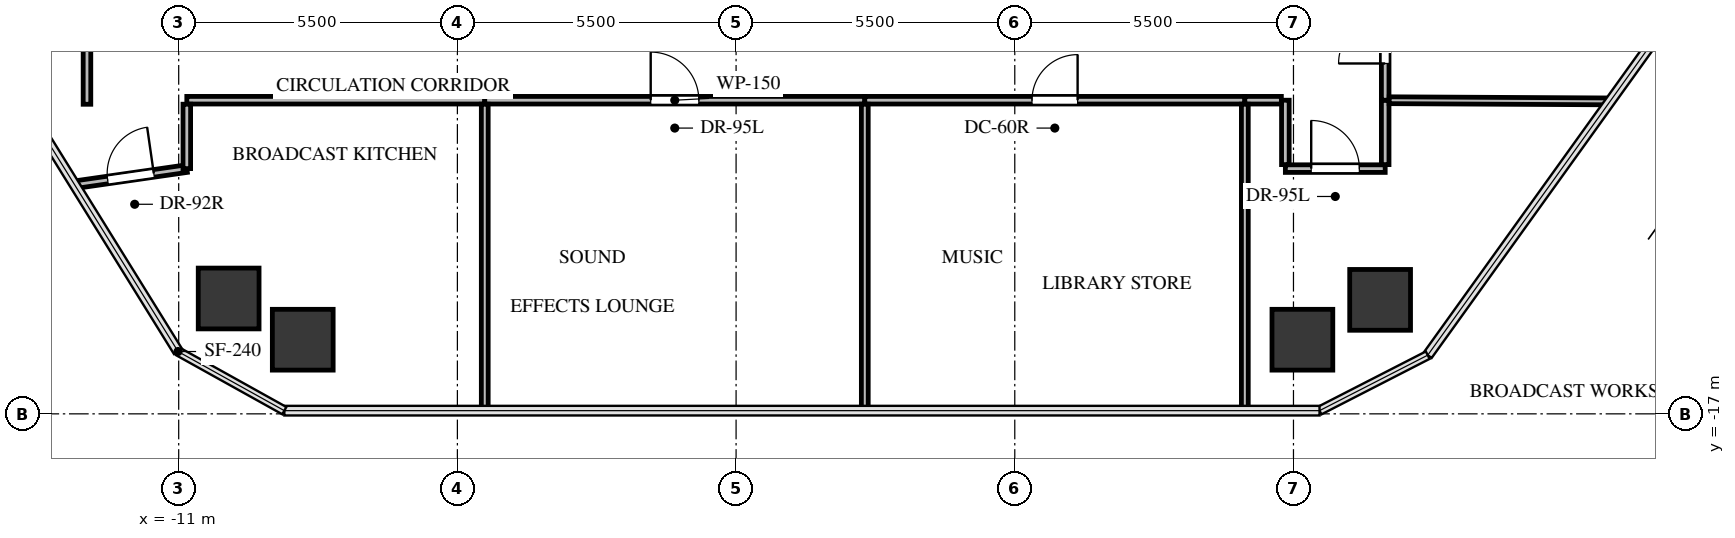
"""IFC4 building model, lengths in metres.
Left out: names, types, materials, properties, quantities, classifications, styles, units other than length and angle.
Written with IfcOpenShell. Run it as: python <this file> out.ifc"""

import sys

from ifc_helpers import new_model, si_unit, direction, frame, frame_2d, origin, origin_2d, place, context, subcontext, project, spatial, rectangle, extrude, source, transform, mapped, element, fill, save


model = new_model("IFC4")
c1 = context("Model", 3, precision=1e-05, world=origin(), true_north=direction((0.0, 1.0)))
c2 = subcontext(c1, "Body", "Model", "MODEL_VIEW")
j1 = project(units=[si_unit("LENGTHUNIT", "METRE"), si_unit("PLANEANGLEUNIT", "RADIAN")], contexts=[c1])
p1 = place(None, origin())
s1 = spatial("IfcSite", under=j1, at=p1, CompositionType="ELEMENT")
p2 = place(p1, origin())
s2 = spatial("IfcBuilding", under=s1, at=p2, CompositionType="ELEMENT")
p3 = place(p2, frame((0.0, 0.0, 123.9)))
s3 = spatial("IfcBuildingStorey", under=s2, at=p3, CompositionType="ELEMENT", Elevation=123.9)
m1 = source(origin(), c2, "Body", "SweptSolid", [
    extrude(rectangle(XDim=1.2, YDim=1.2, at=origin_2d()), origin(), (0.0, 0.0, 1.0), 3.3),
])
for number, where, z_axis, x_axis in (
    (1, (-10.014, -14.723, -0.24), (0.0, 0.0, 1.0), (1.0, 0.0, 0.0)),
    (2, (12.71, -14.75, -0.24), (0.0, 0.0, 1.0), (1.0, 0.0, 0.0)),
    (3, (11.176, -15.537, -0.24), (0.0, 0.0, 1.0), (1.0, 0.0, 0.0)),
    (4, (-8.552, -15.537, -0.24), (0.0, 0.0, 1.0), (1.0, 0.0, 0.0)),
):
    element("IfcColumn", number, at=place(p3, frame(where, z_axis=z_axis, x_axis=x_axis)), inside=s3, PredefinedType="COLUMN", context=c2, shape_type="MappedRepresentation", body=[
        mapped(m1, transform((0.0, 0.0, 0.0), x_axis=(1.0, 0.0, 0.0), y_axis=(0.0, 1.0, 0.0), z_axis=(0.0, 0.0, 1.0), scale=1.0)),
    ])
p4 = place(p3, frame((-10.84, -10.81, 0.0), z_axis=(0.0, 0.0, 1.0), x_axis=(1.0, 0.0, 0.0)))
e5 = element("IfcWall", 5, at=p4, inside=s3, PredefinedType="PARTITIONING", context=c2, shape_type="SweptSolid", body=[
    extrude(rectangle(XDim=5.88, YDim=0.15, at=frame_2d((2.94, 0.0))), origin(), (0.0, 0.0, 1.0), 2.212),
])
p5 = place(p3, frame((-13.054, -12.479, 0.0), z_axis=(0.0, 0.0, 1.0), x_axis=(0.989787303338, 0.142552075227, 0.0)))
e6 = element("IfcWall", 6, at=p5, inside=s3, PredefinedType="PARTITIONING", context=c2, shape_type="SweptSolid", body=[
    extrude(rectangle(XDim=2.237, YDim=0.15, at=frame_2d((1.118, 0.0))), origin(), (0.0, 0.0, 1.0), 2.38),
])
p6 = place(p5, frame((0.658, 0.0, 0.0)))
e7 = element("IfcOpeningElement", 7, at=p6, cuts=e6, PredefinedType="OPENING", context=c2, shape_type="SweptSolid", body=[
    extrude(rectangle(XDim=0.92, YDim=2.1, at=frame_2d((0.46, 1.05))), frame((0.0, 0.085, 0.0), z_axis=(0.0, -1.0, 0.0), x_axis=(1.0, 0.0, 0.0)), (0.0, 0.0, 1.0), 0.17),
])
p7 = place(p3, frame((-10.84, -12.16, 0.0), z_axis=(0.0, 0.0, 1.0), x_axis=(0.0, 1.0, 0.0)))
e8 = element("IfcWall", 8, at=p7, inside=s3, PredefinedType="PARTITIONING", context=c2, shape_type="SweptSolid", body=[
    extrude(rectangle(XDim=1.271, YDim=0.15, at=frame_2d((0.635, 0.0))), origin(), (0.0, 0.0, 1.0), 3.045),
])
p8 = place(p3, frame((-4.96, -10.81, 0.0), z_axis=(0.0, 0.0, 1.0), x_axis=(1.0, 0.0, 0.0)))
e9 = element("IfcWall", 9, at=p8, inside=s3, PredefinedType="PARTITIONING", context=c2, shape_type="SweptSolid", body=[
    extrude(rectangle(XDim=7.5, YDim=0.15, at=frame_2d((3.75, 0.0))), origin(), (0.0, 0.0, 1.0), 2.212),
])
p9 = place(p8, frame((3.275, 0.0, 0.0)))
e10 = element("IfcOpeningElement", 10, at=p9, cuts=e9, PredefinedType="OPENING", context=c2, shape_type="SweptSolid", body=[
    extrude(rectangle(XDim=0.95, YDim=2.1, at=frame_2d((0.475, 1.05))), frame((0.0, 0.085, 0.0), z_axis=(0.0, -1.0, 0.0), x_axis=(1.0, 0.0, 0.0)), (0.0, 0.0, 1.0), 0.17),
])
p10 = place(p3, frame((2.54, -10.81, 0.0), z_axis=(0.0, 0.0, 1.0), x_axis=(1.0, 0.0, 0.0)))
e11 = element("IfcWall", 11, at=p10, inside=s3, PredefinedType="PARTITIONING", context=c2, shape_type="SweptSolid", body=[
    extrude(rectangle(XDim=7.5, YDim=0.15, at=frame_2d((3.75, 0.0))), origin(), (0.0, 0.0, 1.0), 2.212),
])
p11 = place(p10, frame((3.3, 0.0, 0.0)))
e12 = element("IfcOpeningElement", 12, at=p11, cuts=e11, PredefinedType="OPENING", context=c2, shape_type="SweptSolid", body=[
    extrude(rectangle(XDim=0.9, YDim=2.05, at=frame_2d((0.45, 1.025))), frame((0.0, 0.085, 0.0), z_axis=(0.0, -1.0, 0.0), x_axis=(1.0, 0.0, 0.0)), (0.0, 0.0, 1.0), 0.17),
])
p12 = place(p3, frame((10.84, -12.16, 0.0), z_axis=(0.0, 0.0, 1.0), x_axis=(1.0, 0.0, 0.0)))
e13 = element("IfcWall", 13, at=p12, inside=s3, PredefinedType="PARTITIONING", context=c2, shape_type="SweptSolid", body=[
    extrude(rectangle(XDim=1.97, YDim=0.15, at=frame_2d((0.985, 0.0))), origin(), (0.0, 0.0, 1.0), 3.045),
])
p13 = place(p12, frame((0.51, 0.0, 0.0)))
e14 = element("IfcOpeningElement", 14, at=p13, cuts=e13, PredefinedType="OPENING", context=c2, shape_type="SweptSolid", body=[
    extrude(rectangle(XDim=0.95, YDim=2.1, at=frame_2d((0.475, 1.05))), frame((0.0, 0.085, 0.0), z_axis=(0.0, -1.0, 0.0), x_axis=(1.0, 0.0, 0.0)), (0.0, 0.0, 1.0), 0.17),
])
for number, where, z_axis, x_axis in (
    (15, (10.84, -10.81, 0.0), (0.0, 0.0, 1.0), (0.0, -1.0, 0.0)),
    (16, (12.81, -12.081, 0.0), (0.0, 0.0, 1.0), (0.0, 1.0, 0.0)),
):
    element("IfcWall", number, at=place(p3, frame(where, z_axis=z_axis, x_axis=x_axis)), inside=s3, PredefinedType="PARTITIONING", context=c2, shape_type="SweptSolid", body=[
        extrude(rectangle(XDim=1.271, YDim=0.15, at=frame_2d((0.635, 0.0))), origin(), (0.0, 0.0, 1.0), 3.045),
    ])
p14 = place(p3, frame((10.04, -10.81, 0.0), z_axis=(0.0, 0.0, 1.0), x_axis=(1.0, 0.0, 0.0)))
e17 = element("IfcWall", 17, at=p14, inside=s3, PredefinedType="PARTITIONING", context=c2, shape_type="SweptSolid", body=[
    extrude(rectangle(XDim=0.721, YDim=0.15, at=frame_2d((0.36, 0.0))), origin(), (0.0, 0.0, 1.0), 3.045),
])
p15 = place(p3, frame((-12.81, -6.46, 0.0), z_axis=(0.0, 0.0, 1.0), x_axis=(0.0, -1.0, 0.0)))
e18 = element("IfcWall", 18, at=p15, inside=s3, PredefinedType="PARTITIONING", context=c2, shape_type="SweptSolid", body=[
    extrude(rectangle(XDim=4.43, YDim=0.15, at=frame_2d((2.215, 0.0))), origin(), (0.0, 0.0, 1.0), 2.38),
])
p16 = place(p15, frame((1.415, 0.0, 0.0)))
e19 = element("IfcOpeningElement", 19, at=p16, cuts=e18, PredefinedType="OPENING", context=c2, shape_type="SweptSolid", body=[
    extrude(rectangle(XDim=1.6, YDim=2.15, at=frame_2d((0.8, 1.075))), frame((0.0, 0.085, 0.0), z_axis=(0.0, -1.0, 0.0), x_axis=(1.0, 0.0, 0.0)), (0.0, 0.0, 1.0), 0.17),
])
p17 = place(p3, frame((12.81, -10.81, 0.0), z_axis=(0.0, 0.0, 1.0), x_axis=(0.0, 1.0, 0.0)))
e20 = element("IfcWall", 20, at=p17, inside=s3, PredefinedType="PARTITIONING", context=c2, shape_type="SweptSolid", body=[
    extrude(rectangle(XDim=2.37, YDim=0.15, at=frame_2d((1.185, 0.0))), origin(), (0.0, 0.0, 1.0), 3.045),
])
p18 = place(p17, frame((0.725, 0.0, 0.0)))
e21 = element("IfcOpeningElement", 21, at=p18, cuts=e20, PredefinedType="OPENING", context=c2, shape_type="SweptSolid", body=[
    extrude(rectangle(XDim=0.92, YDim=2.1, at=frame_2d((0.46, 1.05))), frame((0.0, 0.085, 0.0), z_axis=(0.0, -1.0, 0.0), x_axis=(1.0, 0.0, 0.0)), (0.0, 0.0, 1.0), 0.17),
])
p19 = place(p3, frame((-4.96, -10.889, 0.0), z_axis=(0.0, 0.0, 1.0), x_axis=(0.0, -1.0, 0.0)))
e22 = element("IfcWall", 22, at=p19, inside=s3, PredefinedType="PARTITIONING", context=c2, shape_type="SweptSolid", body=[
    extrude(rectangle(XDim=6.048, YDim=0.135, at=frame_2d((3.024, 0.0))), origin(), (0.0, 0.0, 1.0), 2.212),
])
p20 = place(p3, frame((2.54, -10.889, 0.0), z_axis=(0.0, 0.0, 1.0), x_axis=(0.0, -1.0, 0.0)))
e23 = element("IfcWall", 23, at=p20, inside=s3, PredefinedType="PARTITIONING", context=c2, shape_type="SweptSolid", body=[
    extrude(rectangle(XDim=6.048, YDim=0.135, at=frame_2d((3.024, 0.0))), origin(), (0.0, 0.0, 1.0), 2.38),
])
p21 = place(p3, frame((10.04, -10.889, 0.0), z_axis=(0.0, 0.0, 1.0), x_axis=(0.0, -1.0, 0.0)))
e24 = element("IfcWall", 24, at=p21, inside=s3, PredefinedType="PARTITIONING", context=c2, shape_type="SweptSolid", body=[
    extrude(rectangle(XDim=6.048, YDim=0.135, at=frame_2d((3.024, 0.0))), origin(), (0.0, 0.0, 1.0), 2.212),
])
p22 = place(p3, frame((12.889, -10.81, 0.0), z_axis=(0.0, 0.0, 1.0), x_axis=(0.999986140562, -0.005264853658, 0.0)))
e25 = element("IfcWall", 25, at=p22, inside=s3, PredefinedType="PARTITIONING", context=c2, shape_type="SweptSolid", body=[
    extrude(rectangle(XDim=4.359, YDim=0.135, at=frame_2d((2.179, 0.0))), origin(), (0.0, 0.0, 1.0), 2.38),
])
m2 = source(origin(), c2, "Body", "SweptSolid", [
    extrude(rectangle(XDim=0.92, YDim=2.1, at=frame_2d((0.46, 1.05))), frame((0.0, 0.025, 0.0), z_axis=(0.0, -1.0, 0.0), x_axis=(1.0, 0.0, 0.0)), (0.0, 0.0, 1.0), 0.05),
])
p23 = place(p6, origin())
e26 = element("IfcDoor", 26, at=p23, inside=s3, OperationType="SINGLE_SWING_RIGHT", PredefinedType="DOOR", context=c2, shape_type="MappedRepresentation", body=[
    mapped(m2, transform((0.0, 0.0, 0.0), x_axis=(1.0, 0.0, 0.0), y_axis=(0.0, 1.0, 0.0), z_axis=(0.0, 0.0, 1.0), scale=1.0)),
])
fill(e7, e26)
m3 = source(origin(), c2, "Body", "SweptSolid", [
    extrude(rectangle(XDim=0.95, YDim=2.1, at=frame_2d((0.475, 1.05))), frame((0.0, 0.025, 0.0), z_axis=(0.0, -1.0, 0.0), x_axis=(1.0, 0.0, 0.0)), (0.0, 0.0, 1.0), 0.05),
])
p24 = place(p9, origin())
e27 = element("IfcDoor", 27, at=p24, inside=s3, OperationType="SINGLE_SWING_LEFT", PredefinedType="DOOR", context=c2, shape_type="MappedRepresentation", body=[
    mapped(m3, transform((0.0, 0.0, 0.0), x_axis=(1.0, 0.0, 0.0), y_axis=(0.0, 1.0, 0.0), z_axis=(0.0, 0.0, 1.0), scale=1.0)),
])
fill(e10, e27)
m4 = source(origin(), c2, "Body", "SweptSolid", [
    extrude(rectangle(XDim=0.9, YDim=2.05, at=frame_2d((0.45, 1.025))), frame((0.0, 0.025, 0.0), z_axis=(0.0, -1.0, 0.0), x_axis=(1.0, 0.0, 0.0)), (0.0, 0.0, 1.0), 0.05),
])
p25 = place(p11, origin())
e28 = element("IfcDoor", 28, at=p25, inside=s3, OperationType="SINGLE_SWING_RIGHT", PredefinedType="DOOR", context=c2, shape_type="MappedRepresentation", body=[
    mapped(m4, transform((0.0, 0.0, 0.0), x_axis=(1.0, 0.0, 0.0), y_axis=(0.0, 1.0, 0.0), z_axis=(0.0, 0.0, 1.0), scale=1.0)),
])
fill(e12, e28)
p26 = place(p13, origin())
e29 = element("IfcDoor", 29, at=p26, inside=s3, OperationType="SINGLE_SWING_LEFT", PredefinedType="DOOR", context=c2, shape_type="MappedRepresentation", body=[
    mapped(m3, transform((0.0, 0.0, 0.0), x_axis=(1.0, 0.0, 0.0), y_axis=(0.0, 1.0, 0.0), z_axis=(0.0, 0.0, 1.0), scale=1.0)),
])
fill(e14, e29)
m5 = source(origin(), c2, "Body", "SweptSolid", [
    extrude(rectangle(XDim=0.92, YDim=2.1, at=frame_2d((0.46, 1.05))), frame((0.0, 0.025, 0.0), z_axis=(0.0, -1.0, 0.0), x_axis=(1.0, 0.0, 0.0)), (0.0, 0.0, 1.0), 0.05),
])
p27 = place(p18, origin())
e30 = element("IfcDoor", 30, at=p27, inside=s3, OperationType="SINGLE_SWING_LEFT", PredefinedType="DOOR", context=c2, shape_type="MappedRepresentation", body=[
    mapped(m5, transform((0.0, 0.0, 0.0), x_axis=(1.0, 0.0, 0.0), y_axis=(0.0, 1.0, 0.0), z_axis=(0.0, 0.0, 1.0), scale=1.0)),
])
fill(e21, e30)
save(model, sys.argv[1])
